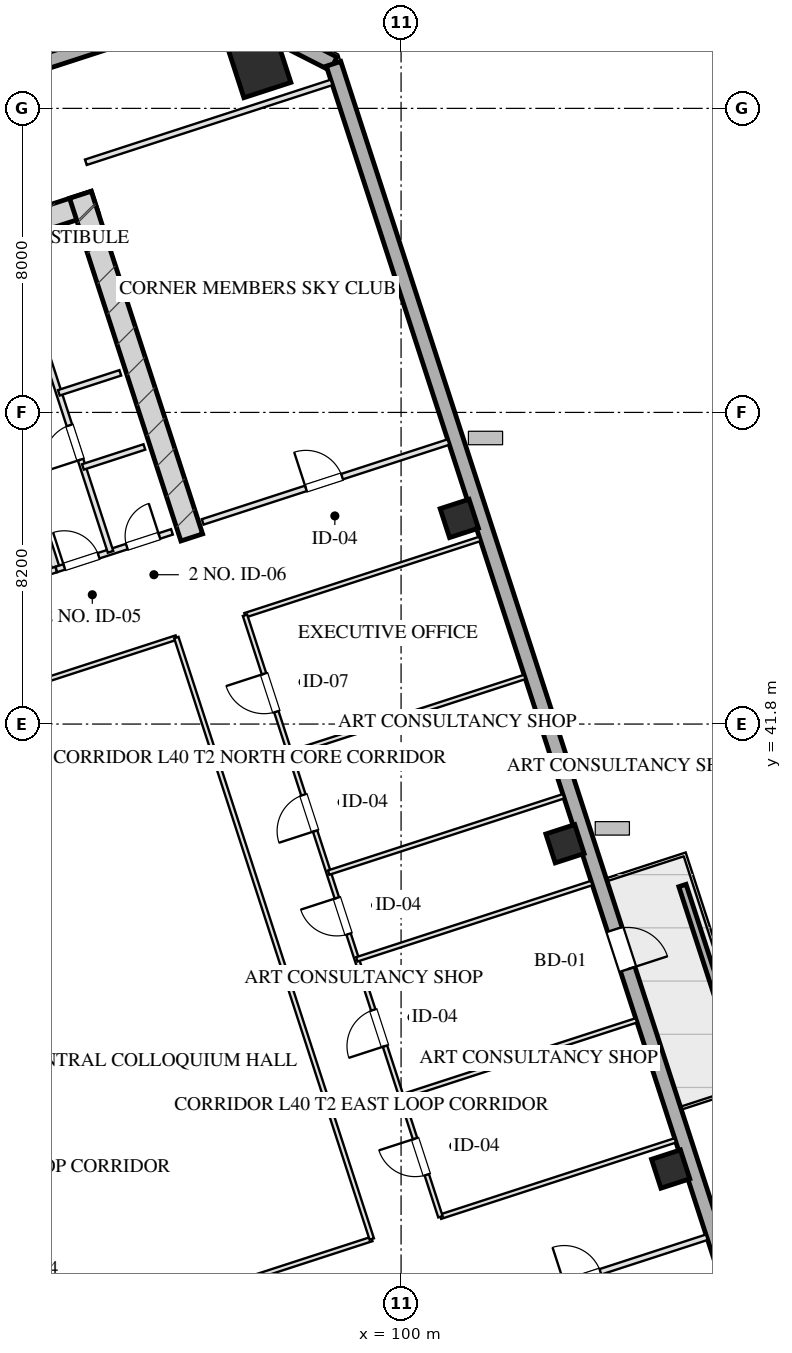
"""IFC4 building model, lengths in metres.
Left out: names, types, materials, properties, quantities, classifications, styles, units other than length and angle.
Written with IfcOpenShell. Run it as: python <this file> out.ifc"""

import sys

from ifc_helpers import new_model, si_unit, direction, frame, frame_2d, origin, origin_2d, place, context, subcontext, project, spatial, rectangle, hollow_rectangle, extrude, element, fill, save


model = new_model("IFC4")
c1 = context("Model", 3, precision=1e-05, world=origin(), true_north=direction((0.0, 1.0)))
c2 = subcontext(c1, "Body", "Model", "MODEL_VIEW")
j1 = project(units=[si_unit("LENGTHUNIT", "METRE"), si_unit("PLANEANGLEUNIT", "RADIAN")], contexts=[c1])
p1 = place(None, origin())
s1 = spatial("IfcSite", under=j1, at=p1, CompositionType="ELEMENT")
p2 = place(p1, origin())
s2 = spatial("IfcBuilding", under=s1, at=p2, CompositionType="ELEMENT")
p3 = place(p2, frame((0.0, 0.0, 152.95)))
s3 = spatial("IfcBuildingStorey", under=s2, at=p3, CompositionType="ELEMENT", Elevation=152.95)
p4 = place(p3, frame((76.344, 50.466, 0.0), z_axis=(0.0, 0.0, 1.0), x_axis=(0.951055727519, 0.309019421968, 0.0)))
e1 = element("IfcWall", 1, at=p4, inside=s3, PredefinedType="SHEAR", context=c2, shape_type="SweptSolid", body=[
    extrude(rectangle(XDim=16.4, YDim=0.6, at=frame_2d((8.2, 0.0))), origin(), (0.0, 0.0, 1.0), 3.45),
])
p5 = place(p3, frame((94.492, 46.71, 0.0), z_axis=(0.0, 0.0, 1.0), x_axis=(-0.309010370028, 0.95105866865, 0.0)))
e2 = element("IfcWall", 2, at=p5, inside=s3, PredefinedType="SHEAR", context=c2, shape_type="SweptSolid", body=[
    extrude(rectangle(XDim=9.48, YDim=0.6, at=frame_2d((4.74, 0.0))), origin(), (0.0, 0.0, 1.0), 3.45),
])
p6 = place(p3, frame((96.281, 59.099, 0.0), z_axis=(0.0, 0.0, 1.0), x_axis=(0.951056516295, 0.309016994375, 0.0)))
e3 = element("IfcColumn", 3, at=p6, inside=s3, PredefinedType="COLUMN", context=c2, shape_type="SweptSolid", body=[
    extrude(hollow_rectangle(XDim=1.3, YDim=1.3, WallThickness=0.045, at=origin_2d()), origin(), (0.0, 0.0, 1.0), 3.451),
])
for number, where, z_axis, x_axis in (
    (4, (107.094, 30.091, 0.0), (0.0, 0.0, 1.0), (0.951, 0.309, 0.0)),
    (5, (104.313, 38.651, 0.0), (0.0, 0.0, 1.0), (0.951, 0.309, 0.0)),
    (6, (101.532, 47.21, 0.0), (0.0, 0.0, 1.0), (0.951, 0.309, 0.0)),
):
    element("IfcColumn", number, at=place(p3, frame(where, z_axis=z_axis, x_axis=x_axis)), inside=s3, PredefinedType="COLUMN", context=c2, shape_type="SweptSolid", body=[
        extrude(hollow_rectangle(XDim=0.8, YDim=0.8, WallThickness=0.028, at=origin_2d()), origin(), (0.0, 0.0, 1.0), 3.451),
    ])
p7 = place(p3, frame((70.092, 52.556, 0.0), z_axis=(0.0, 0.0, 1.0), x_axis=(0.951057580055, 0.30901372044, 0.0)))
e7 = element("IfcWall", 7, at=p7, inside=s3, PredefinedType="SOLIDWALL", context=c2, shape_type="SweptSolid", body=[
    extrude(rectangle(XDim=26.4, YDim=0.4, at=frame_2d((13.2, 0.0))), origin(), (0.0, 0.0, 1.0), 2.61),
])
p8 = place(p3, frame((95.199, 60.714, 0.0), z_axis=(0.0, 0.0, 1.0), x_axis=(0.891020832027, -0.453962417932, 0.0)))
e8 = element("IfcWall", 8, at=p8, inside=s3, PredefinedType="SOLIDWALL", context=c2, shape_type="SweptSolid", body=[
    extrude(rectangle(XDim=3.394, YDim=0.4, at=frame_2d((1.697, 0.0))), origin(), (0.0, 0.0, 1.0), 2.61),
])
p9 = place(p3, frame((98.224, 59.173, 0.0), z_axis=(0.0, 0.0, 1.0), x_axis=(0.309014228706, -0.951057414911, 0.0)))
e9 = element("IfcWall", 9, at=p9, inside=s3, PredefinedType="SOLIDWALL", context=c2, shape_type="SweptSolid", body=[
    extrude(rectangle(XDim=42.8, YDim=0.4, at=frame_2d((21.4, 0.0))), origin(), (0.0, 0.0, 1.0), 2.61),
])
p10 = place(p9, frame((23.95, 0.0, 0.0)))
e10 = element("IfcOpeningElement", 10, at=p10, cuts=e9, PredefinedType="OPENING", context=c2, shape_type="SweptSolid", body=[
    extrude(rectangle(XDim=1.1, YDim=2.15, at=frame_2d((0.55, 1.075))), frame((0.0, 0.21, 0.0), z_axis=(0.0, -1.0, 0.0), x_axis=(1.0, 0.0, 0.0)), (0.0, 0.0, 1.0), 0.42),
])
p11 = place(p3, frame((108.887, 32.987, 0.0), z_axis=(0.0, 0.0, 1.0), x_axis=(-0.30900096172, 0.951061725471, 0.0)))
e11 = element("IfcWall", 11, at=p11, inside=s3, PredefinedType="PARAPET", context=c2, shape_type="SweptSolid", body=[
    extrude(rectangle(XDim=4.8, YDim=0.2, at=frame_2d((2.4, 0.0))), origin(), (0.0, 0.0, 1.0), 0.75),
])
p12 = place(p3, frame((90.928, 45.868, 0.0), z_axis=(0.0, 0.0, 1.0), x_axis=(-0.309042196757, 0.951048327176, 0.0)))
e12 = element("IfcWall", 12, at=p12, inside=s3, PredefinedType="PARTITIONING", context=c2, shape_type="SweptSolid", body=[
    extrude(rectangle(XDim=8.43, YDim=0.2, at=frame_2d((4.215, 0.0))), origin(), (0.0, 0.0, 1.0), 3.175),
])
p13 = place(p3, frame((86.743, 44.508, 0.0), z_axis=(0.0, 0.0, 1.0), x_axis=(0.951063829732, 0.308994485023, 0.0)))
e13 = element("IfcWall", 13, at=p13, inside=s3, PredefinedType="PARTITIONING", context=c2, shape_type="SweptSolid", body=[
    extrude(rectangle(XDim=4.4, YDim=0.15, at=frame_2d((2.2, 0.0))), origin(), (0.0, 0.0, 1.0), 3.175),
])
p14 = place(p13, frame((1.45, 0.0, 0.0)))
e14 = element("IfcOpeningElement", 14, at=p14, cuts=e13, PredefinedType="OPENING", context=c2, shape_type="SweptSolid", body=[
    extrude(rectangle(XDim=1.5, YDim=2.05, at=frame_2d((0.75, 1.025))), frame((0.0, 0.085, 0.0), z_axis=(0.0, -1.0, 0.0), x_axis=(1.0, 0.0, 0.0)), (0.0, 0.0, 1.0), 0.17),
])
p15 = place(p3, frame((90.928, 45.868, 0.0), z_axis=(0.0, 0.0, 1.0), x_axis=(0.951059297078, 0.309008435874, 0.0)))
e15 = element("IfcWall", 15, at=p15, inside=s3, PredefinedType="PARTITIONING", context=c2, shape_type="SweptSolid", body=[
    extrude(rectangle(XDim=3.2, YDim=0.15, at=frame_2d((1.6, 0.0))), origin(), (0.0, 0.0, 1.0), 3.175),
])
p16 = place(p15, frame((0.22, 0.0, 0.0)))
e16 = element("IfcOpeningElement", 16, at=p16, cuts=e15, PredefinedType="OPENING", context=c2, shape_type="SweptSolid", body=[
    extrude(rectangle(XDim=0.95, YDim=2.05, at=frame_2d((0.475, 1.025))), frame((0.0, 0.085, 0.0), z_axis=(0.0, -1.0, 0.0), x_axis=(1.0, 0.0, 0.0)), (0.0, 0.0, 1.0), 0.17),
])
p17 = place(p15, frame((1.95, 0.0, 0.0)))
e17 = element("IfcOpeningElement", 17, at=p17, cuts=e15, PredefinedType="OPENING", context=c2, shape_type="SweptSolid", body=[
    extrude(rectangle(XDim=0.9, YDim=2.05, at=frame_2d((0.45, 1.025))), frame((0.0, 0.085, 0.0), z_axis=(0.0, -1.0, 0.0), x_axis=(1.0, 0.0, 0.0)), (0.0, 0.0, 1.0), 0.17),
])
p18 = place(p3, frame((92.355, 46.331, 0.0), z_axis=(0.0, 0.0, 1.0), x_axis=(-0.309007490203, 0.951059604335, 0.0)))
e18 = element("IfcWall", 18, at=p18, inside=s3, PredefinedType="PARTITIONING", context=c2, shape_type="SweptSolid", body=[
    extrude(rectangle(XDim=8.43, YDim=0.15, at=frame_2d((4.215, 0.0))), origin(), (0.0, 0.0, 1.0), 3.175),
])
p19 = place(p18, frame((2.55, 0.0, 0.0)))
e19 = element("IfcOpeningElement", 19, at=p19, cuts=e18, PredefinedType="OPENING", context=c2, shape_type="SweptSolid", body=[
    extrude(rectangle(XDim=0.95, YDim=2.05, at=frame_2d((0.475, 1.025))), frame((0.0, 0.085, 0.0), z_axis=(0.0, -1.0, 0.0), x_axis=(1.0, 0.0, 0.0)), (0.0, 0.0, 1.0), 0.17),
])
p20 = place(p18, frame((5.6, 0.0, 0.0)))
e20 = element("IfcOpeningElement", 20, at=p20, cuts=e18, PredefinedType="OPENING", context=c2, shape_type="SweptSolid", body=[
    extrude(rectangle(XDim=0.9, YDim=2.05, at=frame_2d((0.45, 1.025))), frame((0.0, 0.085, 0.0), z_axis=(0.0, -1.0, 0.0), x_axis=(1.0, 0.0, 0.0)), (0.0, 0.0, 1.0), 0.17),
])
p21 = place(p3, frame((90.995, 50.516, 0.0), z_axis=(0.0, 0.0, 1.0), x_axis=(0.951040401051, 0.309066587596, 0.0)))
e21 = element("IfcWall", 21, at=p21, inside=s3, PredefinedType="PARTITIONING", context=c2, shape_type="SweptSolid", body=[
    extrude(rectangle(XDim=1.7, YDim=0.15, at=frame_2d((0.85, 0.0))), origin(), (0.0, 0.0, 1.0), 3.175),
])
p22 = place(p3, frame((91.628, 48.566, 0.0), z_axis=(0.0, 0.0, 1.0), x_axis=(0.951054116971, 0.309024378638, 0.0)))
e22 = element("IfcWall", 22, at=p22, inside=s3, PredefinedType="PARTITIONING", context=c2, shape_type="SweptSolid", body=[
    extrude(rectangle(XDim=1.7, YDim=0.15, at=frame_2d((0.85, 0.0))), origin(), (0.0, 0.0, 1.0), 3.175),
])
p23 = place(p3, frame((101.578, 26.196, 0.0), z_axis=(0.0, 0.0, 1.0), x_axis=(0.951064934653, 0.308991084134, 0.0)))
e23 = element("IfcWall", 23, at=p23, inside=s3, PredefinedType="PARTITIONING", context=c2, shape_type="SweptSolid", body=[
    extrude(rectangle(XDim=6.8, YDim=0.15, at=frame_2d((3.4, 0.0))), origin(), (0.0, 0.0, 1.0), 3.175),
])
p24 = place(p23, frame((2.856, 0.0, 0.0)))
e24 = element("IfcOpeningElement", 24, at=p24, cuts=e23, PredefinedType="OPENING", context=c2, shape_type="SweptSolid", body=[
    extrude(rectangle(XDim=1.0, YDim=2.05, at=frame_2d((0.5, 1.025))), frame((0.0, 0.085, 0.0), z_axis=(0.0, -1.0, 0.0), x_axis=(1.0, 0.0, 0.0)), (0.0, 0.0, 1.0), 0.17),
])
p25 = place(p3, frame((91.705, 56.582, 0.0), z_axis=(0.0, 0.0, 1.0), x_axis=(0.951057811516, 0.309013008068, 0.0)))
e25 = element("IfcWall", 25, at=p25, inside=s3, PredefinedType="PARTITIONING", context=c2, shape_type="SweptSolid", body=[
    extrude(rectangle(XDim=6.8, YDim=0.15, at=frame_2d((3.4, 0.0))), origin(), (0.0, 0.0, 1.0), 3.175),
])
p26 = place(p3, frame((94.78, 47.119, 0.0), z_axis=(0.0, 0.0, 1.0), x_axis=(0.951057811516, 0.309013008068, 0.0)))
e26 = element("IfcWall", 26, at=p26, inside=s3, PredefinedType="PARTITIONING", context=c2, shape_type="SweptSolid", body=[
    extrude(rectangle(XDim=6.8, YDim=0.15, at=frame_2d((3.4, 0.0))), origin(), (0.0, 0.0, 1.0), 3.175),
])
p27 = place(p26, frame((2.856, 0.0, 0.0)))
e27 = element("IfcOpeningElement", 27, at=p27, cuts=e26, PredefinedType="OPENING", context=c2, shape_type="SweptSolid", body=[
    extrude(rectangle(XDim=1.0, YDim=2.05, at=frame_2d((0.5, 1.025))), frame((0.0, 0.085, 0.0), z_axis=(0.0, -1.0, 0.0), x_axis=(1.0, 0.0, 0.0)), (0.0, 0.0, 1.0), 0.17),
])
p28 = place(p3, frame((91.382, 25.701, 0.0), z_axis=(0.0, 0.0, 1.0), x_axis=(0.951061683147, 0.309001091988, 0.0)))
e28 = element("IfcWall", 28, at=p28, inside=s3, PredefinedType="PARTITIONING", context=c2, shape_type="SweptSolid", body=[
    extrude(rectangle(XDim=8.25, YDim=0.12, at=frame_2d((4.125, 0.0))), origin(), (0.0, 0.0, 1.0), 3.175),
])
p29 = place(p3, frame((101.035, 28.837, 0.0), z_axis=(0.0, 0.0, 1.0), x_axis=(0.95104869662, 0.309041059824, 0.0)))
e29 = element("IfcWall", 29, at=p29, inside=s3, PredefinedType="PARTITIONING", context=c2, shape_type="SweptSolid", body=[
    extrude(rectangle(XDim=6.5, YDim=0.12, at=frame_2d((3.25, 0.0))), origin(), (0.0, 0.0, 1.0), 3.175),
])
p30 = place(p3, frame((86.24, 41.527, 0.0), z_axis=(0.0, 0.0, 1.0), x_axis=(0.951058857521, 0.309009788731, 0.0)))
e30 = element("IfcWall", 30, at=p30, inside=s3, PredefinedType="PARTITIONING", context=c2, shape_type="SweptSolid", body=[
    extrude(rectangle(XDim=8.25, YDim=0.12, at=frame_2d((4.125, 0.0))), origin(), (0.0, 0.0, 1.0), 3.175),
])
p31 = place(p3, frame((95.893, 44.663, 0.0), z_axis=(0.0, 0.0, 1.0), x_axis=(0.951059735424, 0.30900708674, 0.0)))
e31 = element("IfcWall", 31, at=p31, inside=s3, PredefinedType="PARTITIONING", context=c2, shape_type="SweptSolid", body=[
    extrude(rectangle(XDim=6.5, YDim=0.12, at=frame_2d((3.25, 0.0))), origin(), (0.0, 0.0, 1.0), 3.175),
])
p32 = place(p3, frame((91.382, 25.701, 0.0), z_axis=(0.0, 0.0, 1.0), x_axis=(-0.309004459387, 0.951060589068, 0.0)))
e32 = element("IfcWall", 32, at=p32, inside=s3, PredefinedType="PARTITIONING", context=c2, shape_type="SweptSolid", body=[
    extrude(rectangle(XDim=16.64, YDim=0.12, at=frame_2d((8.32, 0.0))), origin(), (0.0, 0.0, 1.0), 3.175),
])
p33 = place(p32, frame((7.987, 0.0, 0.0)))
e33 = element("IfcOpeningElement", 33, at=p33, cuts=e32, PredefinedType="OPENING", context=c2, shape_type="SweptSolid", body=[
    extrude(rectangle(XDim=1.1, YDim=2.05, at=frame_2d((0.55, 1.025))), frame((0.0, 0.07, 0.0), z_axis=(0.0, -1.0, 0.0), x_axis=(1.0, 0.0, 0.0)), (0.0, 0.0, 1.0), 0.14),
])
p34 = place(p3, frame((99.229, 28.25, 0.0), z_axis=(0.0, 0.0, 1.0), x_axis=(-0.30901773025, 0.951056277195, 0.0)))
e34 = element("IfcWall", 34, at=p34, inside=s3, PredefinedType="PARTITIONING", context=c2, shape_type="SweptSolid", body=[
    extrude(rectangle(XDim=16.64, YDim=0.12, at=frame_2d((8.32, 0.0))), origin(), (0.0, 0.0, 1.0), 3.175),
])
p35 = place(p3, frame((101.035, 28.837, 0.0), z_axis=(0.0, 0.0, 1.0), x_axis=(-0.30901773025, 0.951056277195, 0.0)))
e35 = element("IfcWall", 35, at=p35, inside=s3, PredefinedType="PARTITIONING", context=c2, shape_type="SweptSolid", body=[
    extrude(rectangle(XDim=16.64, YDim=0.12, at=frame_2d((8.32, 0.0))), origin(), (0.0, 0.0, 1.0), 3.175),
])
p36 = place(p35, frame((1.16, 0.0, 0.0)))
e36 = element("IfcOpeningElement", 36, at=p36, cuts=e35, PredefinedType="OPENING", context=c2, shape_type="SweptSolid", body=[
    extrude(rectangle(XDim=1.0, YDim=2.05, at=frame_2d((0.5, 1.025))), frame((0.0, 0.07, 0.0), z_axis=(0.0, -1.0, 0.0), x_axis=(1.0, 0.0, 0.0)), (0.0, 0.0, 1.0), 0.14),
])
p37 = place(p35, frame((4.72, 0.0, 0.0)))
e37 = element("IfcOpeningElement", 37, at=p37, cuts=e35, PredefinedType="OPENING", context=c2, shape_type="SweptSolid", body=[
    extrude(rectangle(XDim=1.0, YDim=2.05, at=frame_2d((0.5, 1.025))), frame((0.0, 0.07, 0.0), z_axis=(0.0, -1.0, 0.0), x_axis=(1.0, 0.0, 0.0)), (0.0, 0.0, 1.0), 0.14),
])
p38 = place(p35, frame((7.82, 0.0, 0.0)))
e38 = element("IfcOpeningElement", 38, at=p38, cuts=e35, PredefinedType="OPENING", context=c2, shape_type="SweptSolid", body=[
    extrude(rectangle(XDim=1.0, YDim=2.05, at=frame_2d((0.5, 1.025))), frame((0.0, 0.07, 0.0), z_axis=(0.0, -1.0, 0.0), x_axis=(1.0, 0.0, 0.0)), (0.0, 0.0, 1.0), 0.14),
])
p39 = place(p35, frame((10.671, 0.0, 0.0)))
e39 = element("IfcOpeningElement", 39, at=p39, cuts=e35, PredefinedType="OPENING", context=c2, shape_type="SweptSolid", body=[
    extrude(rectangle(XDim=1.0, YDim=2.05, at=frame_2d((0.5, 1.025))), frame((0.0, 0.07, 0.0), z_axis=(0.0, -1.0, 0.0), x_axis=(1.0, 0.0, 0.0)), (0.0, 0.0, 1.0), 0.14),
])
p40 = place(p35, frame((13.971, 0.0, 0.0)))
e40 = element("IfcOpeningElement", 40, at=p40, cuts=e35, PredefinedType="OPENING", context=c2, shape_type="SweptSolid", body=[
    extrude(rectangle(XDim=1.05, YDim=2.05, at=frame_2d((0.525, 1.025))), frame((0.0, 0.07, 0.0), z_axis=(0.0, -1.0, 0.0), x_axis=(1.0, 0.0, 0.0)), (0.0, 0.0, 1.0), 0.14),
])
for number, where, z_axis, x_axis in (
    (41, (100.01, 31.995, 0.0), (0.0, 0.0, 1.0), (0.951, 0.309, 0.0)),
    (42, (98.835, 35.609, 0.0), (0.0, 0.0, 1.0), (0.951, 0.309, 0.0)),
    (43, (98.094, 37.892, 0.0), (0.0, 0.0, 1.0), (0.951, 0.309, 0.0)),
    (44, (97.073, 41.031, 0.0), (0.0, 0.0, 1.0), (0.951, 0.309, 0.0)),
):
    element("IfcWall", number, at=place(p3, frame(where, z_axis=z_axis, x_axis=x_axis)), inside=s3, PredefinedType="PARTITIONING", context=c2, shape_type="SweptSolid", body=[
        extrude(rectangle(XDim=6.5, YDim=0.12, at=frame_2d((3.25, 0.0))), origin(), (0.0, 0.0, 1.0), 3.175),
    ])
p41 = place(p10, origin())
e45 = element("IfcDoor", 45, at=p41, inside=s3, OperationType="SINGLE_SWING_RIGHT", PredefinedType="DOOR", context=c2, shape_type="SweptSolid", body=[
    extrude(rectangle(XDim=1.1, YDim=2.15, at=frame_2d((0.55, 1.075))), frame((0.0, 0.025, 0.0), z_axis=(0.0, -1.0, 0.0), x_axis=(1.0, 0.0, 0.0)), (0.0, 0.0, 1.0), 0.05),
])
fill(e10, e45)
p42 = place(p16, origin())
e46 = element("IfcDoor", 46, at=p42, inside=s3, OperationType="SINGLE_SWING_LEFT", PredefinedType="DOOR", context=c2, shape_type="SweptSolid", body=[
    extrude(rectangle(XDim=0.95, YDim=2.05, at=frame_2d((0.475, 1.025))), frame((0.0, 0.025, 0.0), z_axis=(0.0, -1.0, 0.0), x_axis=(1.0, 0.0, 0.0)), (0.0, 0.0, 1.0), 0.05),
])
fill(e16, e46)
p43 = place(p17, origin())
e47 = element("IfcDoor", 47, at=p43, inside=s3, OperationType="SINGLE_SWING_RIGHT", PredefinedType="DOOR", context=c2, shape_type="SweptSolid", body=[
    extrude(rectangle(XDim=0.9, YDim=2.05, at=frame_2d((0.45, 1.025))), frame((0.0, 0.025, 0.0), z_axis=(0.0, -1.0, 0.0), x_axis=(1.0, 0.0, 0.0)), (0.0, 0.0, 1.0), 0.05),
])
fill(e17, e47)
p44 = place(p19, origin())
e48 = element("IfcDoor", 48, at=p44, inside=s3, OperationType="SINGLE_SWING_LEFT", PredefinedType="DOOR", context=c2, shape_type="SweptSolid", body=[
    extrude(rectangle(XDim=0.95, YDim=2.05, at=frame_2d((0.475, 1.025))), frame((0.0, 0.025, 0.0), z_axis=(0.0, -1.0, 0.0), x_axis=(1.0, 0.0, 0.0)), (0.0, 0.0, 1.0), 0.05),
])
fill(e19, e48)
p45 = place(p24, origin())
e49 = element("IfcDoor", 49, at=p45, inside=s3, OperationType="SINGLE_SWING_LEFT", PredefinedType="DOOR", context=c2, shape_type="SweptSolid", body=[
    extrude(rectangle(XDim=1.0, YDim=2.05, at=frame_2d((0.5, 1.025))), frame((0.0, 0.025, 0.0), z_axis=(0.0, -1.0, 0.0), x_axis=(1.0, 0.0, 0.0)), (0.0, 0.0, 1.0), 0.05),
])
fill(e24, e49)
p46 = place(p27, origin())
e50 = element("IfcDoor", 50, at=p46, inside=s3, OperationType="SINGLE_SWING_LEFT", PredefinedType="DOOR", context=c2, shape_type="SweptSolid", body=[
    extrude(rectangle(XDim=1.0, YDim=2.05, at=frame_2d((0.5, 1.025))), frame((0.0, 0.025, 0.0), z_axis=(0.0, -1.0, 0.0), x_axis=(1.0, 0.0, 0.0)), (0.0, 0.0, 1.0), 0.05),
])
fill(e27, e50)
p47 = place(p36, origin())
e51 = element("IfcDoor", 51, at=p47, inside=s3, OperationType="SINGLE_SWING_RIGHT", PredefinedType="DOOR", context=c2, shape_type="SweptSolid", body=[
    extrude(rectangle(XDim=1.0, YDim=2.05, at=frame_2d((0.5, 1.025))), frame((0.0, 0.025, 0.0), z_axis=(0.0, -1.0, 0.0), x_axis=(1.0, 0.0, 0.0)), (0.0, 0.0, 1.0), 0.05),
])
fill(e36, e51)
p48 = place(p37, origin())
e52 = element("IfcDoor", 52, at=p48, inside=s3, OperationType="SINGLE_SWING_LEFT", PredefinedType="DOOR", context=c2, shape_type="SweptSolid", body=[
    extrude(rectangle(XDim=1.0, YDim=2.05, at=frame_2d((0.5, 1.025))), frame((0.0, 0.025, 0.0), z_axis=(0.0, -1.0, 0.0), x_axis=(1.0, 0.0, 0.0)), (0.0, 0.0, 1.0), 0.05),
])
fill(e37, e52)
p49 = place(p38, origin())
e53 = element("IfcDoor", 53, at=p49, inside=s3, OperationType="SINGLE_SWING_RIGHT", PredefinedType="DOOR", context=c2, shape_type="SweptSolid", body=[
    extrude(rectangle(XDim=1.0, YDim=2.05, at=frame_2d((0.5, 1.025))), frame((0.0, 0.025, 0.0), z_axis=(0.0, -1.0, 0.0), x_axis=(1.0, 0.0, 0.0)), (0.0, 0.0, 1.0), 0.05),
])
fill(e38, e53)
p50 = place(p39, origin())
e54 = element("IfcDoor", 54, at=p50, inside=s3, OperationType="SINGLE_SWING_LEFT", PredefinedType="DOOR", context=c2, shape_type="SweptSolid", body=[
    extrude(rectangle(XDim=1.0, YDim=2.05, at=frame_2d((0.5, 1.025))), frame((0.0, 0.025, 0.0), z_axis=(0.0, -1.0, 0.0), x_axis=(1.0, 0.0, 0.0)), (0.0, 0.0, 1.0), 0.05),
])
fill(e39, e54)
p51 = place(p40, origin())
e55 = element("IfcDoor", 55, at=p51, inside=s3, OperationType="SINGLE_SWING_RIGHT", PredefinedType="DOOR", context=c2, shape_type="SweptSolid", body=[
    extrude(rectangle(XDim=1.05, YDim=2.05, at=frame_2d((0.525, 1.025))), frame((0.0, 0.025, 0.0), z_axis=(0.0, -1.0, 0.0), x_axis=(1.0, 0.0, 0.0)), (0.0, 0.0, 1.0), 0.05),
])
fill(e40, e55)
save(model, sys.argv[1])
